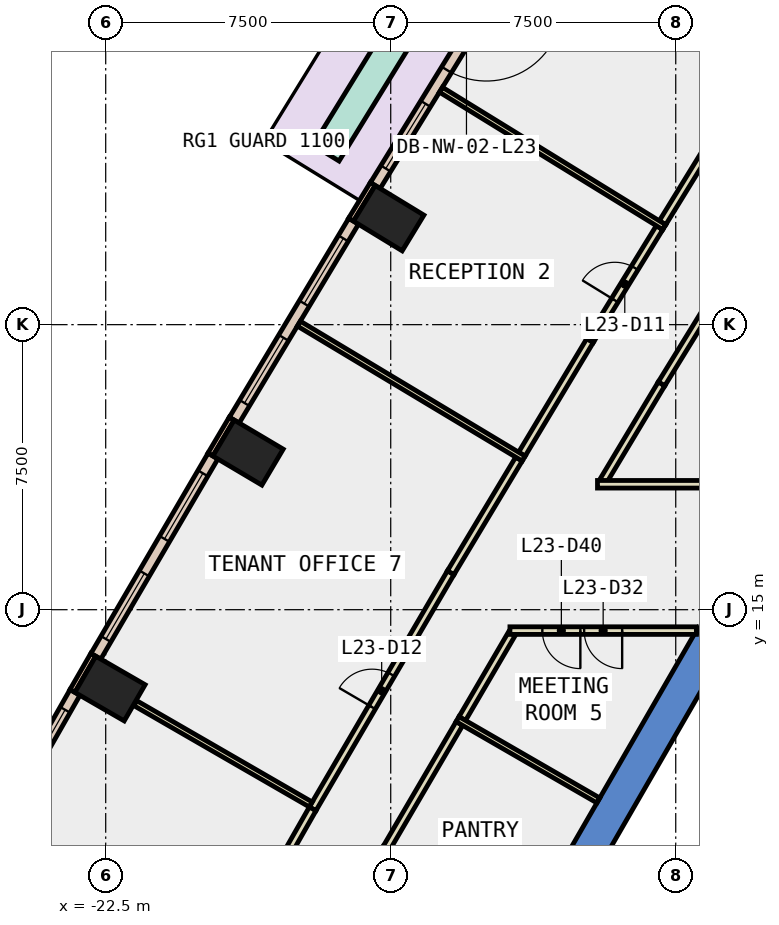
"""IFC4 building model, lengths in metres.
Left out: names, types, materials, properties, quantities, classifications, styles, units other than length and angle.
Written with IfcOpenShell. Run it as: python <this file> out.ifc"""

import sys

from ifc_helpers import new_model, si_unit, direction, frame, frame_2d, origin, origin_2d, place, context, subcontext, project, spatial, polyline, rectangle, outline, extrude, element, fill, save


model = new_model("IFC4")
c1 = context("Model", 3, precision=1e-05, world=origin(), true_north=direction((0.0, 1.0)))
c2 = subcontext(c1, "Body", "Model", "MODEL_VIEW")
j1 = project(units=[si_unit("LENGTHUNIT", "METRE"), si_unit("PLANEANGLEUNIT", "RADIAN")], contexts=[c1])
p1 = place(None, origin())
s1 = spatial("IfcSite", under=j1, at=p1, CompositionType="ELEMENT")
p2 = place(p1, origin())
s2 = spatial("IfcBuilding", under=s1, at=p2, CompositionType="ELEMENT")
p3 = place(p2, frame((0.0, 0.0, 107.6)))
s3 = spatial("IfcBuildingStorey", under=s2, at=p3, CompositionType="ELEMENT", Elevation=107.6)
for number, where, z_axis, x_axis in (
    (1, (-15.053, 25.302, -0.4), (0.0, 0.0, 1.0), (0.52, 0.854, 0.0)),
    (2, (-18.755, 19.134, -0.4), (0.0, 0.0, 1.0), (0.51, 0.86, 0.0)),
    (3, (-22.387, 12.925, -0.4), (0.0, 0.0, 1.0), (0.5, 0.866, 0.0)),
):
    element("IfcColumn", number, at=place(p3, frame(where, z_axis=z_axis, x_axis=x_axis)), inside=s3, PredefinedType="COLUMN", context=c2, shape_type="SweptSolid", body=[
        extrude(rectangle(XDim=1.1, YDim=1.5, at=origin_2d()), origin(), (0.0, 0.0, 1.0), 4.2),
    ])
p4 = place(p3, frame((0.0, 0.0, -0.4)))
e4 = element("IfcWall", 4, at=p4, inside=s3, PredefinedType="SHEAR", context=c2, shape_type="SweptSolid", body=[
    extrude(outline(polyline([(-4.55, 13.6), (-4.55, 14.5), (-6.928, 14.5), (-6.409, 13.6), (-4.55, 13.6)])), origin(), (0.0, 0.0, 1.0), 4.2),
])
p5 = place(p3, frame((0.0, 0.0, -0.4)))
e5 = element("IfcWall", 5, at=p5, inside=s3, PredefinedType="SHEAR", context=c2, shape_type="SweptSolid", body=[
    extrude(outline(polyline([(-12.267, 5.252), (-11.488, 4.802), (-6.409, 13.6), (-6.928, 14.5), (-12.267, 5.252)])), origin(), (0.0, 0.0, 1.0), 4.2),
])
p6 = place(p3, frame((-15.472, 26.201, 0.0), z_axis=(0.0, 0.0, 1.0), x_axis=(-0.519869515594, -0.854245682901, 0.0)))
e6 = element("IfcWall", 6, at=p6, inside=s3, PredefinedType="STANDARD", context=c2, shape_type="SweptSolid", body=[
    extrude(rectangle(XDim=1.1, YDim=0.15, at=frame_2d((0.55, 0.0))), origin(), (0.0, 0.0, 1.0), 3.8),
])
p7 = place(p3, frame((-19.184, 20.028, 0.0), z_axis=(0.0, 0.0, 1.0), x_axis=(-0.510082245696, -0.860125631885, 0.0)))
e7 = element("IfcWall", 7, at=p7, inside=s3, PredefinedType="STANDARD", context=c2, shape_type="SweptSolid", body=[
    extrude(rectangle(XDim=1.1, YDim=0.15, at=frame_2d((0.55, 0.0))), origin(), (0.0, 0.0, 1.0), 3.8),
])
p8 = place(p3, frame((-22.826, 13.814, 0.0), z_axis=(0.0, 0.0, 1.0), x_axis=(-0.499933745558, -0.866063652425, 0.0)))
e8 = element("IfcWall", 8, at=p8, inside=s3, PredefinedType="STANDARD", context=c2, shape_type="SweptSolid", body=[
    extrude(rectangle(XDim=1.1, YDim=0.15, at=frame_2d((0.55, 0.0))), origin(), (0.0, 0.0, 1.0), 3.8),
])
p9 = place(p3, frame((-12.207, 31.358, 0.0), z_axis=(0.0, 0.0, 1.0), x_axis=(-0.524121974895, -0.851643208998, 0.0)))
e9 = element("IfcWall", 9, at=p9, inside=s3, PredefinedType="STANDARD", context=c2, shape_type="SweptSolid", body=[
    extrude(rectangle(XDim=6.104, YDim=0.3, at=frame_2d((3.052, 0.0))), origin(), (0.0, 0.0, 1.0), 3.8),
])
p10 = place(p9, frame((0.526, 0.0, 0.0)))
e10 = element("IfcOpeningElement", 10, at=p10, cuts=e9, PredefinedType="OPENING", context=c2, shape_type="SweptSolid", body=[
    extrude(rectangle(XDim=2.0, YDim=2.4, at=frame_2d((1.0, 1.2))), frame((0.0, 0.16, 0.0), z_axis=(0.0, -1.0, 0.0), x_axis=(1.0, 0.0, 0.0)), (0.0, 0.0, 1.0), 0.32),
])
p11 = place(p9, frame((3.578, 0.0, 0.9)))
e11 = element("IfcOpeningElement", 11, at=p11, cuts=e9, PredefinedType="OPENING", context=c2, shape_type="SweptSolid", body=[
    extrude(rectangle(XDim=2.0, YDim=2.6, at=frame_2d((1.0, 1.3))), frame((0.0, 0.16, 0.0), z_axis=(0.0, -1.0, 0.0), x_axis=(1.0, 0.0, 0.0)), (0.0, 0.0, 1.0), 0.32),
])
p12 = place(p3, frame((-15.976, 25.221, 0.0), z_axis=(0.0, 0.0, 1.0), x_axis=(-0.514560454873, -0.857454102726, 0.0)))
e12 = element("IfcWall", 12, at=p12, inside=s3, PredefinedType="STANDARD", context=c2, shape_type="SweptSolid", body=[
    extrude(rectangle(XDim=6.104, YDim=0.3, at=frame_2d((3.052, 0.0))), origin(), (0.0, 0.0, 1.0), 3.8),
])
p13 = place(p12, frame((0.526, 0.0, 0.9)))
e13 = element("IfcOpeningElement", 13, at=p13, cuts=e12, PredefinedType="OPENING", context=c2, shape_type="SweptSolid", body=[
    extrude(rectangle(XDim=2.0, YDim=2.6, at=frame_2d((1.0, 1.3))), frame((0.0, 0.16, 0.0), z_axis=(0.0, -1.0, 0.0), x_axis=(1.0, 0.0, 0.0)), (0.0, 0.0, 1.0), 0.32),
])
p14 = place(p12, frame((3.578, 0.0, 0.9)))
e14 = element("IfcOpeningElement", 14, at=p14, cuts=e12, PredefinedType="OPENING", context=c2, shape_type="SweptSolid", body=[
    extrude(rectangle(XDim=2.0, YDim=2.6, at=frame_2d((1.0, 1.3))), frame((0.0, 0.16, 0.0), z_axis=(0.0, -1.0, 0.0), x_axis=(1.0, 0.0, 0.0)), (0.0, 0.0, 1.0), 0.32),
])
p15 = place(p3, frame((-19.677, 19.043, 0.0), z_axis=(0.0, 0.0, 1.0), x_axis=(-0.50490018297, -0.863177736759, 0.0)))
e15 = element("IfcWall", 15, at=p15, inside=s3, PredefinedType="STANDARD", context=c2, shape_type="SweptSolid", body=[
    extrude(rectangle(XDim=6.104, YDim=0.3, at=frame_2d((3.052, 0.0))), origin(), (0.0, 0.0, 1.0), 3.8),
])
p16 = place(p15, frame((0.526, 0.0, 0.9)))
e16 = element("IfcOpeningElement", 16, at=p16, cuts=e15, PredefinedType="OPENING", context=c2, shape_type="SweptSolid", body=[
    extrude(rectangle(XDim=2.0, YDim=2.6, at=frame_2d((1.0, 1.3))), frame((0.0, 0.16, 0.0), z_axis=(0.0, -1.0, 0.0), x_axis=(1.0, 0.0, 0.0)), (0.0, 0.0, 1.0), 0.32),
])
p17 = place(p15, frame((3.578, 0.0, 0.9)))
e17 = element("IfcOpeningElement", 17, at=p17, cuts=e15, PredefinedType="OPENING", context=c2, shape_type="SweptSolid", body=[
    extrude(rectangle(XDim=2.0, YDim=2.6, at=frame_2d((1.0, 1.3))), frame((0.0, 0.16, 0.0), z_axis=(0.0, -1.0, 0.0), x_axis=(1.0, 0.0, 0.0)), (0.0, 0.0, 1.0), 0.32),
])
p18 = place(p3, frame((-23.308, 12.823, 0.0), z_axis=(0.0, 0.0, 1.0), x_axis=(-0.495113375427, -0.868828375154, 0.0)))
e18 = element("IfcWall", 18, at=p18, inside=s3, PredefinedType="STANDARD", context=c2, shape_type="SweptSolid", body=[
    extrude(rectangle(XDim=6.104, YDim=0.3, at=frame_2d((3.052, 0.0))), origin(), (0.0, 0.0, 1.0), 3.8),
])
p19 = place(p18, frame((0.526, 0.0, 0.9)))
e19 = element("IfcOpeningElement", 19, at=p19, cuts=e18, PredefinedType="OPENING", context=c2, shape_type="SweptSolid", body=[
    extrude(rectangle(XDim=2.0, YDim=2.6, at=frame_2d((1.0, 1.3))), frame((0.0, 0.16, 0.0), z_axis=(0.0, -1.0, 0.0), x_axis=(1.0, 0.0, 0.0)), (0.0, 0.0, 1.0), 0.32),
])
p20 = place(p18, frame((3.578, 0.0, 0.9)))
e20 = element("IfcOpeningElement", 20, at=p20, cuts=e18, PredefinedType="OPENING", context=c2, shape_type="SweptSolid", body=[
    extrude(rectangle(XDim=2.0, YDim=2.6, at=frame_2d((1.0, 1.3))), frame((0.0, 0.16, 0.0), z_axis=(0.0, -1.0, 0.0), x_axis=(1.0, 0.0, 0.0)), (0.0, 0.0, 1.0), 0.32),
])
p21 = place(p3, frame((-13.553, 32.128, 0.0), z_axis=(0.0, 0.0, 1.0), x_axis=(-0.524156413099, -0.851622013928, 0.0)))
e21 = element("IfcWall", 21, at=p21, inside=s3, PredefinedType="STANDARD", context=c2, shape_type="SweptSolid", body=[
    extrude(rectangle(XDim=6.004, YDim=0.8, at=frame_2d((3.002, 0.0))), origin(), (0.0, 0.0, 1.0), 0.8),
])
p22 = place(p3, frame((-11.814, 14.364, 0.0), z_axis=(0.0, 0.0, 1.0), x_axis=(-0.504658640018, -0.863318977583, 0.0)))
e22 = element("IfcWall", 22, at=p22, inside=s3, PredefinedType="PARTITIONING", context=c2, shape_type="SweptSolid", body=[
    extrude(rectangle(XDim=2.582, YDim=0.2, at=frame_2d((1.291, 0.0))), origin(), (0.0, 0.0, 1.0), 3.8),
])
p23 = place(p3, frame((-13.193, 12.005, 0.0), z_axis=(0.0, 0.0, 1.0), x_axis=(-0.50499711829, -0.863121028894, 0.0)))
e23 = element("IfcWall", 23, at=p23, inside=s3, PredefinedType="PARTITIONING", context=c2, shape_type="SweptSolid", body=[
    extrude(rectangle(XDim=3.8, YDim=0.2, at=frame_2d((1.9, 0.0))), origin(), (0.0, 0.0, 1.0), 3.8),
])
p24 = place(p3, frame((-4.154, 26.985, 0.0), z_axis=(0.0, 0.0, 1.0), x_axis=(-0.524183774504, -0.851605172921, 0.0)))
e24 = element("IfcWall", 24, at=p24, inside=s3, PredefinedType="PARTITIONING", context=c2, shape_type="SweptSolid", body=[
    extrude(rectangle(XDim=7.099, YDim=0.2, at=frame_2d((3.549, 0.0))), origin(), (0.0, 0.0, 1.0), 3.8),
])
p25 = place(p3, frame((-7.875, 20.94, 0.0), z_axis=(0.0, 0.0, 1.0), x_axis=(-0.514399309837, -0.857550785691, 0.0)))
e25 = element("IfcWall", 25, at=p25, inside=s3, PredefinedType="PARTITIONING", context=c2, shape_type="SweptSolid", body=[
    extrude(rectangle(XDim=2.978, YDim=0.2, at=frame_2d((1.489, 0.0))), origin(), (0.0, 0.0, 1.0), 3.8),
])
p26 = place(p3, frame((-7.848, 25.18, 0.0), z_axis=(0.0, 0.0, 1.0), x_axis=(0.524062258075, 0.851679957297, 0.0)))
e26 = element("IfcWall", 26, at=p26, inside=s3, PredefinedType="PARTITIONING", context=c2, shape_type="SweptSolid", body=[
    extrude(rectangle(XDim=3.486, YDim=0.2, at=frame_2d((1.743, 0.0))), origin(), (0.0, 0.0, 1.0), 3.8),
])
p27 = place(p3, frame((-11.549, 19.092, 0.0), z_axis=(0.0, 0.0, 1.0), x_axis=(0.514536939864, 0.857468213705, 0.0)))
e27 = element("IfcWall", 27, at=p27, inside=s3, PredefinedType="PARTITIONING", context=c2, shape_type="SweptSolid", body=[
    extrude(rectangle(XDim=3.487, YDim=0.2, at=frame_2d((1.744, 0.0))), origin(), (0.0, 0.0, 1.0), 3.8),
])
p28 = place(p3, frame((-9.755, 22.082, 0.0), z_axis=(0.0, 0.0, 1.0), x_axis=(0.524140390501, 0.851631875311, 0.0)))
e28 = element("IfcWall", 28, at=p28, inside=s3, PredefinedType="PARTITIONING", context=c2, shape_type="SweptSolid", body=[
    extrude(rectangle(XDim=3.487, YDim=0.2, at=frame_2d((1.744, 0.0))), origin(), (0.0, 0.0, 1.0), 3.8),
])
p29 = place(p28, frame((1.244, 0.0, 0.0)))
e29 = element("IfcOpeningElement", 29, at=p29, cuts=e28, PredefinedType="OPENING", context=c2, shape_type="SweptSolid", body=[
    extrude(rectangle(XDim=1.0, YDim=2.1, at=frame_2d((0.5, 1.05))), frame((0.0, 0.11, 0.0), z_axis=(0.0, -1.0, 0.0), x_axis=(1.0, 0.0, 0.0)), (0.0, 0.0, 1.0), 0.22),
])
p30 = place(p3, frame((-17.055, 9.76, 0.0), z_axis=(0.0, 0.0, 1.0), x_axis=(0.504817517618, 0.863226085047, 0.0)))
e30 = element("IfcWall", 30, at=p30, inside=s3, PredefinedType="PARTITIONING", context=c2, shape_type="SweptSolid", body=[
    extrude(rectangle(XDim=7.199, YDim=0.2, at=frame_2d((3.599, 0.0))), origin(), (0.0, 0.0, 1.0), 3.8),
])
p31 = place(p30, frame((3.099, 0.0, 0.0)))
e31 = element("IfcOpeningElement", 31, at=p31, cuts=e30, PredefinedType="OPENING", context=c2, shape_type="SweptSolid", body=[
    extrude(rectangle(XDim=1.0, YDim=2.1, at=frame_2d((0.5, 1.05))), frame((0.0, 0.11, 0.0), z_axis=(0.0, -1.0, 0.0), x_axis=(1.0, 0.0, 0.0)), (0.0, 0.0, 1.0), 0.22),
])
p32 = place(p3, frame((-13.421, 15.974, 0.0), z_axis=(0.0, 0.0, 1.0), x_axis=(0.514691349792, 0.857375538751, 0.0)))
e32 = element("IfcWall", 32, at=p32, inside=s3, PredefinedType="PARTITIONING", context=c2, shape_type="SweptSolid", body=[
    extrude(rectangle(XDim=3.487, YDim=0.2, at=frame_2d((1.744, 0.0))), origin(), (0.0, 0.0, 1.0), 3.8),
])
p33 = place(p3, frame((-20.581, 3.571, 0.0), z_axis=(0.0, 0.0, 1.0), x_axis=(0.495138372197, 0.868814129937, 0.0)))
e33 = element("IfcWall", 33, at=p33, inside=s3, PredefinedType="PARTITIONING", context=c2, shape_type="SweptSolid", body=[
    extrude(rectangle(XDim=7.124, YDim=0.2, at=frame_2d((3.562, 0.0))), origin(), (0.0, 0.0, 1.0), 3.8),
])
p34 = place(p33, frame((3.137, 0.0, 0.0)))
e34 = element("IfcOpeningElement", 34, at=p34, cuts=e33, PredefinedType="OPENING", context=c2, shape_type="SweptSolid", body=[
    extrude(rectangle(XDim=1.0, YDim=2.1, at=frame_2d((0.5, 1.05))), frame((0.0, 0.11, 0.0), z_axis=(0.0, -1.0, 0.0), x_axis=(1.0, 0.0, 0.0)), (0.0, 0.0, 1.0), 0.22),
])
p35 = place(p3, frame((-9.537, 9.981, 0.0), z_axis=(0.0, 0.0, 1.0), x_axis=(-0.866007866579, 0.5000303741, 0.0)))
e35 = element("IfcWall", 35, at=p35, inside=s3, PredefinedType="PARTITIONING", context=c2, shape_type="SweptSolid", body=[
    extrude(rectangle(XDim=4.278, YDim=0.15, at=frame_2d((2.139, 0.0))), origin(), (0.0, 0.0, 1.0), 3.8),
])
p36 = place(p3, frame((-6.957, 14.45, 0.0), z_axis=(0.0, 0.0, 1.0), x_axis=(-1.0, 0.0, 0.0)))
e36 = element("IfcWall", 36, at=p36, inside=s3, PredefinedType="PARTITIONING", context=c2, shape_type="SweptSolid", body=[
    extrude(rectangle(XDim=4.906, YDim=0.2, at=frame_2d((2.453, 0.0))), origin(), (0.0, 0.0, 1.0), 3.8),
])
p37 = place(p36, frame((1.953, 0.0, 0.0)))
e37 = element("IfcOpeningElement", 37, at=p37, cuts=e36, PredefinedType="OPENING", context=c2, shape_type="SweptSolid", body=[
    extrude(rectangle(XDim=1.0, YDim=2.1, at=frame_2d((0.5, 1.05))), frame((0.0, 0.11, 0.0), z_axis=(0.0, -1.0, 0.0), x_axis=(1.0, 0.0, 0.0)), (0.0, 0.0, 1.0), 0.22),
])
p38 = place(p36, frame((3.053, 0.0, 0.0)))
e38 = element("IfcOpeningElement", 38, at=p38, cuts=e36, PredefinedType="OPENING", context=c2, shape_type="SweptSolid", body=[
    extrude(rectangle(XDim=1.0, YDim=2.1, at=frame_2d((0.5, 1.05))), frame((0.0, 0.11, 0.0), z_axis=(0.0, -1.0, 0.0), x_axis=(1.0, 0.0, 0.0)), (0.0, 0.0, 1.0), 0.22),
])
p39 = place(p3, frame((-9.559, 18.3, 0.0), z_axis=(0.0, 0.0, 1.0), x_axis=(1.0, 0.0, 0.0)))
e39 = element("IfcWall", 39, at=p39, inside=s3, PredefinedType="PARTITIONING", context=c2, shape_type="SweptSolid", body=[
    extrude(rectangle(XDim=9.159, YDim=0.2, at=frame_2d((4.58, 0.0))), origin(), (0.0, 0.0, 1.0), 3.8),
])
p40 = place(p3, frame((-7.802, 25.064, 0.0), z_axis=(0.0, 0.0, 1.0), x_axis=(-0.851596352662, 0.524198103901, 0.0)))
e40 = element("IfcWall", 40, at=p40, inside=s3, PredefinedType="PARTITIONING", context=c2, shape_type="SweptSolid", body=[
    extrude(rectangle(XDim=6.9, YDim=0.15, at=frame_2d((3.45, 0.0))), origin(), (0.0, 0.0, 1.0), 3.8),
])
p41 = place(p3, frame((-11.502, 18.977, 0.0), z_axis=(0.0, 0.0, 1.0), x_axis=(-0.857464824073, 0.514542588595, 0.0)))
e41 = element("IfcWall", 41, at=p41, inside=s3, PredefinedType="PARTITIONING", context=c2, shape_type="SweptSolid", body=[
    extrude(rectangle(XDim=6.899, YDim=0.15, at=frame_2d((3.45, 0.0))), origin(), (0.0, 0.0, 1.0), 3.8),
])
p42 = place(p3, frame((-17.104, 9.875, 0.0), z_axis=(0.0, 0.0, 1.0), x_axis=(-0.866024640963, 0.500001321243, 0.0)))
e42 = element("IfcWall", 42, at=p42, inside=s3, PredefinedType="PARTITIONING", context=c2, shape_type="SweptSolid", body=[
    extrude(rectangle(XDim=5.33, YDim=0.15, at=frame_2d((2.665, 0.0))), origin(), (0.0, 0.0, 1.0), 3.8),
])
p43 = place(p3, frame((-5.03, 9.388, 0.0), z_axis=(0.0, 0.0, 1.0), x_axis=(-0.499978703459, -0.866037698999, 0.0)))
e43 = element("IfcWall", 43, at=p43, inside=s3, PredefinedType="STANDARD", context=c2, shape_type="SweptSolid", body=[
    extrude(rectangle(XDim=6.9, YDim=0.2, at=frame_2d((3.45, 0.0))), origin(), (0.0, 0.0, 1.0), 3.8),
])
p44 = place(p10, origin())
e44 = element("IfcDoor", 44, at=p44, inside=s3, OperationType="SLIDING_TO_LEFT", PredefinedType="DOOR", context=c2, shape_type="SweptSolid", body=[
    extrude(rectangle(XDim=2.0, YDim=2.4, at=frame_2d((1.0, 1.2))), frame((0.0, 0.025, 0.0), z_axis=(0.0, -1.0, 0.0), x_axis=(1.0, 0.0, 0.0)), (0.0, 0.0, 1.0), 0.05),
])
fill(e10, e44)
p45 = place(p11, origin())
e45 = element("IfcWindow", 45, at=p45, inside=s3, PartitioningType="SINGLE_PANEL", PredefinedType="WINDOW", context=c2, shape_type="SweptSolid", body=[
    extrude(rectangle(XDim=2.0, YDim=2.6, at=frame_2d((1.0, 1.3))), frame((0.0, 0.03, 0.0), z_axis=(0.0, -1.0, 0.0), x_axis=(1.0, 0.0, 0.0)), (0.0, 0.0, 1.0), 0.06),
])
fill(e11, e45)
p46 = place(p13, origin())
e46 = element("IfcWindow", 46, at=p46, inside=s3, PartitioningType="SINGLE_PANEL", PredefinedType="WINDOW", context=c2, shape_type="SweptSolid", body=[
    extrude(rectangle(XDim=2.0, YDim=2.6, at=frame_2d((1.0, 1.3))), frame((0.0, 0.03, 0.0), z_axis=(0.0, -1.0, 0.0), x_axis=(1.0, 0.0, 0.0)), (0.0, 0.0, 1.0), 0.06),
])
fill(e13, e46)
p47 = place(p14, origin())
e47 = element("IfcWindow", 47, at=p47, inside=s3, PartitioningType="SINGLE_PANEL", PredefinedType="WINDOW", context=c2, shape_type="SweptSolid", body=[
    extrude(rectangle(XDim=2.0, YDim=2.6, at=frame_2d((1.0, 1.3))), frame((0.0, 0.03, 0.0), z_axis=(0.0, -1.0, 0.0), x_axis=(1.0, 0.0, 0.0)), (0.0, 0.0, 1.0), 0.06),
])
fill(e14, e47)
p48 = place(p16, origin())
e48 = element("IfcWindow", 48, at=p48, inside=s3, PartitioningType="SINGLE_PANEL", PredefinedType="WINDOW", context=c2, shape_type="SweptSolid", body=[
    extrude(rectangle(XDim=2.0, YDim=2.6, at=frame_2d((1.0, 1.3))), frame((0.0, 0.03, 0.0), z_axis=(0.0, -1.0, 0.0), x_axis=(1.0, 0.0, 0.0)), (0.0, 0.0, 1.0), 0.06),
])
fill(e16, e48)
p49 = place(p17, origin())
e49 = element("IfcWindow", 49, at=p49, inside=s3, PartitioningType="SINGLE_PANEL", PredefinedType="WINDOW", context=c2, shape_type="SweptSolid", body=[
    extrude(rectangle(XDim=2.0, YDim=2.6, at=frame_2d((1.0, 1.3))), frame((0.0, 0.03, 0.0), z_axis=(0.0, -1.0, 0.0), x_axis=(1.0, 0.0, 0.0)), (0.0, 0.0, 1.0), 0.06),
])
fill(e17, e49)
p50 = place(p19, origin())
e50 = element("IfcWindow", 50, at=p50, inside=s3, PartitioningType="SINGLE_PANEL", PredefinedType="WINDOW", context=c2, shape_type="SweptSolid", body=[
    extrude(rectangle(XDim=2.0, YDim=2.6, at=frame_2d((1.0, 1.3))), frame((0.0, 0.03, 0.0), z_axis=(0.0, -1.0, 0.0), x_axis=(1.0, 0.0, 0.0)), (0.0, 0.0, 1.0), 0.06),
])
fill(e19, e50)
p51 = place(p29, origin())
e51 = element("IfcDoor", 51, at=p51, inside=s3, OperationType="SINGLE_SWING_LEFT", PredefinedType="DOOR", context=c2, shape_type="SweptSolid", body=[
    extrude(rectangle(XDim=1.0, YDim=2.1, at=frame_2d((0.5, 1.05))), frame((0.0, 0.025, 0.0), z_axis=(0.0, -1.0, 0.0), x_axis=(1.0, 0.0, 0.0)), (0.0, 0.0, 1.0), 0.05),
])
fill(e29, e51)
p52 = place(p31, origin())
e52 = element("IfcDoor", 52, at=p52, inside=s3, OperationType="SINGLE_SWING_LEFT", PredefinedType="DOOR", context=c2, shape_type="SweptSolid", body=[
    extrude(rectangle(XDim=1.0, YDim=2.1, at=frame_2d((0.5, 1.05))), frame((0.0, 0.025, 0.0), z_axis=(0.0, -1.0, 0.0), x_axis=(1.0, 0.0, 0.0)), (0.0, 0.0, 1.0), 0.05),
])
fill(e31, e52)
p53 = place(p37, origin())
e53 = element("IfcDoor", 53, at=p53, inside=s3, OperationType="SINGLE_SWING_LEFT", PredefinedType="DOOR", context=c2, shape_type="SweptSolid", body=[
    extrude(rectangle(XDim=1.0, YDim=2.1, at=frame_2d((0.5, 1.05))), frame((0.0, 0.025, 0.0), z_axis=(0.0, -1.0, 0.0), x_axis=(1.0, 0.0, 0.0)), (0.0, 0.0, 1.0), 0.05),
])
fill(e37, e53)
p54 = place(p38, origin())
e54 = element("IfcDoor", 54, at=p54, inside=s3, OperationType="SINGLE_SWING_RIGHT", PredefinedType="DOOR", context=c2, shape_type="SweptSolid", body=[
    extrude(rectangle(XDim=1.0, YDim=2.1, at=frame_2d((0.5, 1.05))), frame((0.0, 0.025, 0.0), z_axis=(0.0, -1.0, 0.0), x_axis=(1.0, 0.0, 0.0)), (0.0, 0.0, 1.0), 0.05),
])
fill(e38, e54)
save(model, sys.argv[1])
